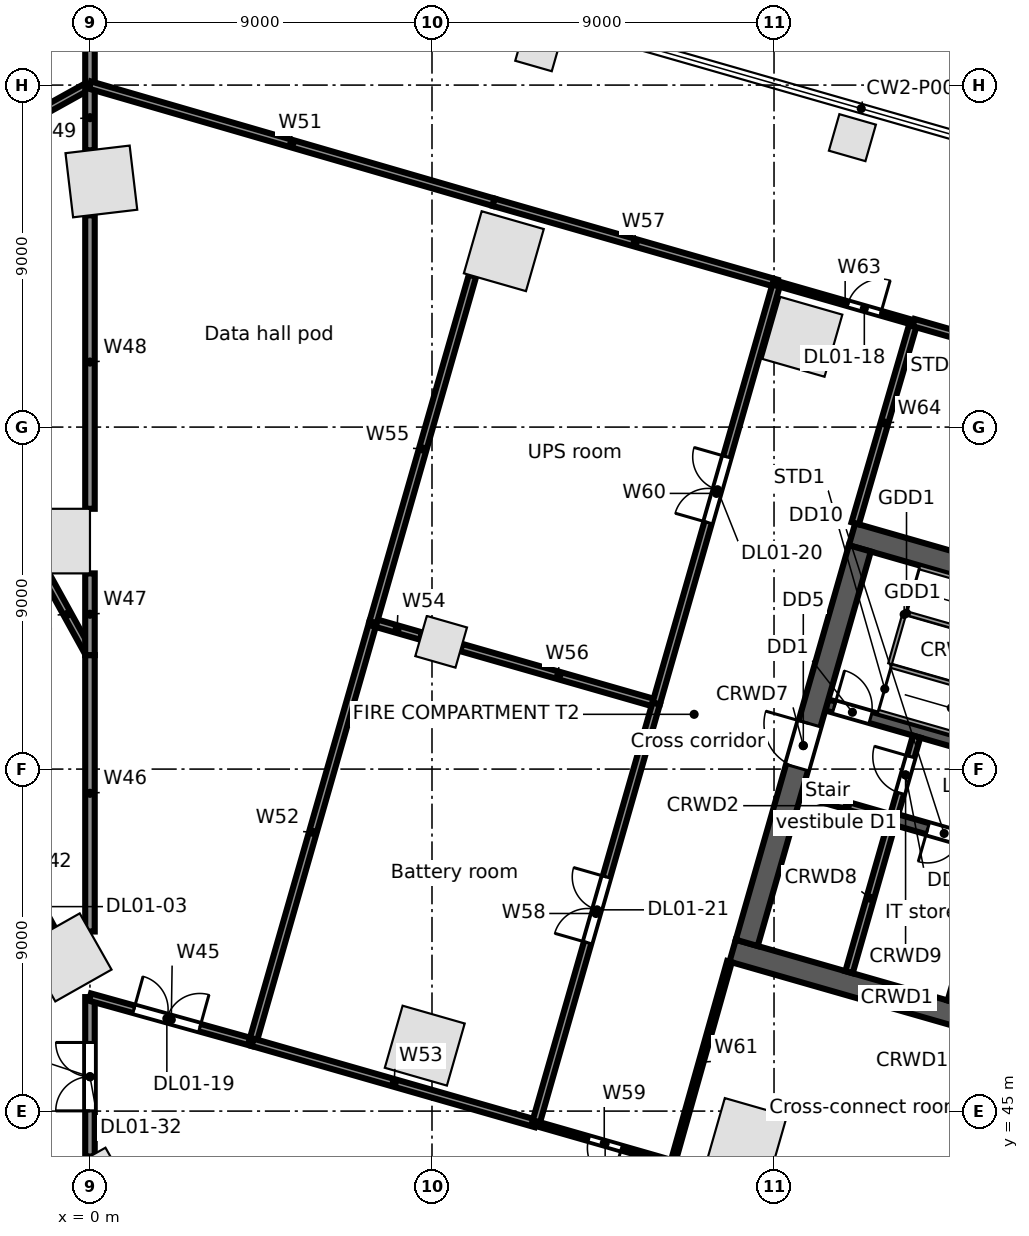
"""IFC4 building model, lengths in metres.
Left out: names, types, materials, properties, quantities, classifications, styles, units other than length and angle.
Written with IfcOpenShell. Run it as: python <this file> out.ifc"""

import sys

from ifc_helpers import new_model, si_unit, direction, frame, frame_2d, origin, origin_2d, place, context, subcontext, project, spatial, rectangle, extrude, element, fill, save


model = new_model("IFC4")
c1 = context("Model", 3, precision=1e-05, world=origin(), true_north=direction((0.0, 1.0)))
c2 = subcontext(c1, "Body", "Model", "MODEL_VIEW")
j1 = project(units=[si_unit("LENGTHUNIT", "METRE"), si_unit("PLANEANGLEUNIT", "RADIAN")], contexts=[c1])
p1 = place(None, origin())
s1 = spatial("IfcSite", under=j1, at=p1, CompositionType="ELEMENT")
p2 = place(p1, origin())
s2 = spatial("IfcBuilding", under=s1, at=p2, CompositionType="ELEMENT")
p3 = place(p2, frame((0.0, 0.0, 11.5)))
s3 = spatial("IfcBuildingStorey", under=s2, at=p3, CompositionType="ELEMENT", Elevation=11.5)
for number, where, z_axis, x_axis in (
    (1, (18.746, 65.376, 0.0), (0.0, 0.0, 1.0), (-0.961, 0.276, 0.0)),
    (2, (10.89, 67.629, 0.0), (0.0, 0.0, 1.0), (-0.961, 0.276, 0.0)),
    (3, (0.3, 69.464, 0.0), (0.0, 0.0, 1.0), (-0.993, -0.118, 0.0)),
    (4, (-0.591, 49.044, 0.0), (0.0, 0.0, 1.0), (0.87, 0.492, 0.0)),
    (5, (8.81, 46.722, 0.0), (0.0, 0.0, 1.0), (0.961, -0.276, 0.0)),
    (6, (17.288, 44.291, 0.0), (0.0, 0.0, 1.0), (0.961, -0.276, 0.0)),
    (7, (-0.85, 60.0, 0.0), (0.0, 0.0, 1.0), (0.0, 1.0, 0.0)),
):
    element("IfcColumn", number, at=place(p3, frame(where, z_axis=z_axis, x_axis=x_axis)), inside=s3, PredefinedType="COLUMN", context=c2, shape_type="SweptSolid", body=[
        extrude(rectangle(XDim=1.7, YDim=1.7, at=origin_2d()), origin(), (0.0, 0.0, 1.0), 5.0),
    ])
for number, where, z_axis, x_axis in (
    (8, (20.062, 70.616, 0.0), (0.0, 0.0, 1.0), (-0.961, 0.276, 0.0)),
    (9, (11.809, 72.983, 0.0), (0.0, 0.0, 1.0), (-0.961, 0.276, 0.0)),
    (10, (0.219, 43.355, 0.0), (0.0, 0.0, 1.0), (0.87, 0.492, 0.0)),
):
    element("IfcColumn", number, at=place(p3, frame(where, z_axis=z_axis, x_axis=x_axis)), inside=s3, PredefinedType="COLUMN", context=c2, shape_type="SweptSolid", body=[
        extrude(rectangle(XDim=1.0, YDim=1.0, at=origin_2d()), origin(), (0.0, 0.0, 1.0), 5.0),
    ])
p4 = place(p3, frame((9.241, 57.35, 0.0), z_axis=(0.0, 0.0, 1.0), x_axis=(0.961261695938, -0.275637355817, 0.0)))
e11 = element("IfcColumn", 11, at=p4, inside=s3, PredefinedType="COLUMN", context=c2, shape_type="SweptSolid", body=[
    extrude(rectangle(XDim=1.1, YDim=1.1, at=origin_2d()), origin(), (0.0, 0.0, 1.0), 5.0),
])
p5 = place(p3, frame((16.911, 49.221, 0.0), z_axis=(0.0, 0.0, 1.0), x_axis=(0.96126248289, -0.275634611374, 0.0)))
e12 = element("IfcWall", 12, at=p5, inside=s3, PredefinedType="SOLIDWALL", context=c2, shape_type="SweptSolid", body=[
    extrude(rectangle(XDim=9.0, YDim=0.6, at=frame_2d((4.5, 0.0))), origin(), (0.0, 0.0, 1.0), 4.65),
])
p6 = place(p3, frame((18.728, 53.382, 0.0), z_axis=(0.0, 0.0, 1.0), x_axis=(0.961247070632, -0.275688355216, 0.0)))
e13 = element("IfcWall", 13, at=p6, inside=s3, PredefinedType="SOLIDWALL", context=c2, shape_type="SweptSolid", body=[
    extrude(rectangle(XDim=2.5, YDim=0.2, at=frame_2d((1.25, 0.0))), origin(), (0.0, 0.0, 1.0), 4.65),
])
p7 = place(p3, frame((21.131, 52.692, 0.0), z_axis=(0.0, 0.0, 1.0), x_axis=(0.961271492568, -0.275603188616, 0.0)))
e14 = element("IfcWall", 14, at=p7, inside=s3, PredefinedType="SOLIDWALL", context=c2, shape_type="SweptSolid", body=[
    extrude(rectangle(XDim=5.3, YDim=0.3, at=frame_2d((2.65, 0.0))), origin(), (0.0, 0.0, 1.0), 4.65),
])
p8 = place(p7, frame((0.95, 0.0, 0.0)))
e15 = element("IfcOpeningElement", 15, at=p8, cuts=e14, PredefinedType="OPENING", context=c2, shape_type="SweptSolid", body=[
    extrude(rectangle(XDim=0.9, YDim=2.1, at=frame_2d((0.45, 1.05))), frame((0.0, 0.16, 0.0), z_axis=(0.0, -1.0, 0.0), x_axis=(1.0, 0.0, 0.0)), (0.0, 0.0, 1.0), 0.32),
])
p9 = place(p7, frame((3.75, 0.0, 0.0)))
e16 = element("IfcOpeningElement", 16, at=p9, cuts=e14, PredefinedType="OPENING", context=c2, shape_type="SweptSolid", body=[
    extrude(rectangle(XDim=0.9, YDim=2.1, at=frame_2d((0.45, 1.05))), frame((0.0, 0.16, 0.0), z_axis=(0.0, -1.0, 0.0), x_axis=(1.0, 0.0, 0.0)), (0.0, 0.0, 1.0), 0.32),
])
p10 = place(p3, frame((19.389, 55.689, 0.0), z_axis=(0.0, 0.0, 1.0), x_axis=(0.961261397636, -0.275638396117, 0.0)))
e17 = element("IfcWall", 17, at=p10, inside=s3, PredefinedType="SOLIDWALL", context=c2, shape_type="SweptSolid", body=[
    extrude(rectangle(XDim=7.1, YDim=0.3, at=frame_2d((3.55, 0.0))), origin(), (0.0, 0.0, 1.0), 4.65),
])
p11 = place(p10, frame((0.2, 0.0, 0.0)))
e18 = element("IfcOpeningElement", 18, at=p11, cuts=e17, PredefinedType="OPENING", context=c2, shape_type="SweptSolid", body=[
    extrude(rectangle(XDim=1.0, YDim=2.1, at=frame_2d((0.5, 1.05))), frame((0.0, 0.16, 0.0), z_axis=(0.0, -1.0, 0.0), x_axis=(1.0, 0.0, 0.0)), (0.0, 0.0, 1.0), 0.32),
])
p12 = place(p3, frame((20.053, 60.18, 0.0), z_axis=(0.0, 0.0, 1.0), x_axis=(0.96126248289, -0.275634611374, 0.0)))
e19 = element("IfcWall", 19, at=p12, inside=s3, PredefinedType="SOLIDWALL", context=c2, shape_type="SweptSolid", body=[
    extrude(rectangle(XDim=9.0, YDim=0.6, at=frame_2d((4.5, 0.0))), origin(), (0.0, 0.0, 1.0), 4.65),
])
p13 = place(p3, frame((17.282, 49.427, 0.0), z_axis=(0.0, 0.0, 1.0), x_axis=(0.275631631629, 0.961263337304, 0.0)))
e20 = element("IfcWall", 20, at=p13, inside=s3, PredefinedType="SOLIDWALL", context=c2, shape_type="SweptSolid", body=[
    extrude(rectangle(XDim=10.8, YDim=0.6, at=frame_2d((5.4, 0.0))), origin(), (0.0, 0.0, 1.0), 4.65),
])
p14 = place(p13, frame((4.8, 0.0, 0.0)))
e21 = element("IfcOpeningElement", 21, at=p14, cuts=e20, PredefinedType="OPENING", context=c2, shape_type="SweptSolid", body=[
    extrude(rectangle(XDim=1.2, YDim=2.1, at=frame_2d((0.6, 1.05))), frame((0.0, 0.31, 0.0), z_axis=(0.0, -1.0, 0.0), x_axis=(1.0, 0.0, 0.0)), (0.0, 0.0, 1.0), 0.62),
])
p15 = place(p3, frame((19.973, 48.655, 0.0), z_axis=(0.0, 0.0, 1.0), x_axis=(0.275668441653, 0.961252781674, 0.0)))
e22 = element("IfcWall", 22, at=p15, inside=s3, PredefinedType="SOLIDWALL", context=c2, shape_type="SweptSolid", body=[
    extrude(rectangle(XDim=4.05, YDim=0.2, at=frame_2d((2.025, 0.0))), origin(), (0.0, 0.0, 1.0), 4.65),
])
p16 = place(p3, frame((21.172, 52.837, 0.0), z_axis=(0.0, 0.0, 1.0), x_axis=(0.275657676022, 0.961255868981, 0.0)))
e23 = element("IfcWall", 23, at=p16, inside=s3, PredefinedType="PARTITIONING", context=c2, shape_type="SweptSolid", body=[
    extrude(rectangle(XDim=2.1, YDim=0.2, at=frame_2d((1.05, 0.0))), origin(), (0.0, 0.0, 1.0), 4.65),
])
p17 = place(p16, frame((0.55, 0.0, 0.0)))
e24 = element("IfcOpeningElement", 24, at=p17, cuts=e23, PredefinedType="OPENING", context=c2, shape_type="SweptSolid", body=[
    extrude(rectangle(XDim=1.0, YDim=2.1, at=frame_2d((0.5, 1.05))), frame((0.0, 0.11, 0.0), z_axis=(0.0, -1.0, 0.0), x_axis=(1.0, 0.0, 0.0)), (0.0, 0.0, 1.0), 0.22),
])
p18 = place(p3, frame((22.665, 47.883, 0.0), z_axis=(0.0, 0.0, 1.0), x_axis=(0.275596769212, 0.961273333033, 0.0)))
e25 = element("IfcWall", 25, at=p18, inside=s3, PredefinedType="PARTITIONING", context=c2, shape_type="SweptSolid", body=[
    extrude(rectangle(XDim=4.05, YDim=0.2, at=frame_2d((2.025, 0.0))), origin(), (0.0, 0.0, 1.0), 4.65),
])
p19 = place(p3, frame((-6.337, 68.478, 0.0), z_axis=(0.0, 0.0, 1.0), x_axis=(0.87407148623, 0.485797320864, 0.0)))
e26 = element("IfcWall", 26, at=p19, inside=s3, PredefinedType="PARTITIONING", context=c2, shape_type="SweptSolid", body=[
    extrude(rectangle(XDim=7.25, YDim=0.2, at=frame_2d((3.625, 0.0))), origin(), (0.0, 0.0, 1.0), 3.93),
])
p20 = place(p19, frame((2.7, 0.0, 0.0)))
e27 = element("IfcOpeningElement", 27, at=p20, cuts=e26, PredefinedType="OPENING", context=c2, shape_type="SweptSolid", body=[
    extrude(rectangle(XDim=1.8, YDim=2.1, at=frame_2d((0.9, 1.05))), frame((0.0, 0.11, 0.0), z_axis=(0.0, -1.0, 0.0), x_axis=(1.0, 0.0, 0.0)), (0.0, 0.0, 1.0), 0.22),
])
p21 = place(p3, frame((-1.883, 51.467, 0.0), z_axis=(0.0, 0.0, 1.0), x_axis=(0.477162952876, -0.878814836244, 0.0)))
e28 = element("IfcWall", 28, at=p21, inside=s3, PredefinedType="PARTITIONING", context=c2, shape_type="SweptSolid", body=[
    extrude(rectangle(XDim=1.895, YDim=0.125, at=frame_2d((0.947, 0.0))), origin(), (0.0, 0.0, 1.0), 4.65),
])
p22 = place(p3, frame((-1.187, 59.15, 0.0), z_axis=(0.0, 0.0, 1.0), x_axis=(0.483345381597, -0.875429747089, 0.0)))
e29 = element("IfcWall", 29, at=p22, inside=s3, PredefinedType="PARTITIONING", context=c2, shape_type="SweptSolid", body=[
    extrude(rectangle(XDim=2.456, YDim=0.2, at=frame_2d((1.228, 0.0))), origin(), (0.0, 0.0, 1.0), 4.65),
])
p23 = place(p3, frame((0.0, 43.806, 0.0), z_axis=(0.0, 0.0, 1.0), x_axis=(0.0, 1.0, 0.0)))
e30 = element("IfcWall", 30, at=p23, inside=s3, PredefinedType="PARTITIONING", context=c2, shape_type="SweptSolid", body=[
    extrude(rectangle(XDim=4.194, YDim=0.25, at=frame_2d((2.097, 0.0))), origin(), (0.0, 0.0, 1.0), 3.712),
])
p24 = place(p23, frame((1.2, 0.0, 0.0)))
e31 = element("IfcOpeningElement", 31, at=p24, cuts=e30, PredefinedType="OPENING", context=c2, shape_type="SweptSolid", body=[
    extrude(rectangle(XDim=1.8, YDim=2.1, at=frame_2d((0.9, 1.05))), frame((0.0, 0.135, 0.0), z_axis=(0.0, -1.0, 0.0), x_axis=(1.0, 0.0, 0.0)), (0.0, 0.0, 1.0), 0.27),
])
p25 = place(p3, frame((0.0, 48.0, 0.0), z_axis=(0.0, 0.0, 1.0), x_axis=(0.963400508162, -0.268066150181, 0.0)))
e32 = element("IfcWall", 32, at=p25, inside=s3, PredefinedType="PARTITIONING", context=c2, shape_type="SweptSolid", body=[
    extrude(rectangle(XDim=4.443, YDim=0.2, at=frame_2d((2.221, 0.0))), origin(), (0.0, 0.0, 1.0), 4.65),
])
p26 = place(p25, frame((1.2, 0.0, 0.0)))
e33 = element("IfcOpeningElement", 33, at=p26, cuts=e32, PredefinedType="OPENING", context=c2, shape_type="SweptSolid", body=[
    extrude(rectangle(XDim=1.8, YDim=2.1, at=frame_2d((0.9, 1.05))), frame((0.0, 0.11, 0.0), z_axis=(0.0, -1.0, 0.0), x_axis=(1.0, 0.0, 0.0)), (0.0, 0.0, 1.0), 0.22),
])
p27 = place(p3, frame((0.0, 49.726, 0.0), z_axis=(0.0, 0.0, 1.0), x_axis=(0.0, 1.0, 0.0)))
e34 = element("IfcWall", 34, at=p27, inside=s3, PredefinedType="PARTITIONING", context=c2, shape_type="SweptSolid", body=[
    extrude(rectangle(XDim=7.274, YDim=0.25, at=frame_2d((3.637, 0.0))), origin(), (0.0, 0.0, 1.0), 4.65),
])
p28 = place(p3, frame((0.0, 57.0, 0.0), z_axis=(0.0, 0.0, 1.0), x_axis=(0.0, 1.0, 0.0)))
e35 = element("IfcWall", 35, at=p28, inside=s3, PredefinedType="PARTITIONING", context=c2, shape_type="SweptSolid", body=[
    extrude(rectangle(XDim=2.15, YDim=0.25, at=frame_2d((1.075, 0.0))), origin(), (0.0, 0.0, 1.0), 4.65),
])
p29 = place(p3, frame((0.0, 60.85, 0.0), z_axis=(0.0, 0.0, 1.0), x_axis=(0.0, 1.0, 0.0)))
e36 = element("IfcWall", 36, at=p29, inside=s3, PredefinedType="PARTITIONING", context=c2, shape_type="SweptSolid", body=[
    extrude(rectangle(XDim=7.723, YDim=0.25, at=frame_2d((3.861, 0.0))), origin(), (0.0, 0.0, 1.0), 3.93),
])
p30 = place(p3, frame((0.0, 70.285, 0.0), z_axis=(0.0, 0.0, 1.0), x_axis=(0.0, 1.0, 0.0)))
e37 = element("IfcWall", 37, at=p30, inside=s3, PredefinedType="PARTITIONING", context=c2, shape_type="SweptSolid", body=[
    extrude(rectangle(XDim=1.715, YDim=0.25, at=frame_2d((0.857, 0.0))), origin(), (0.0, 0.0, 1.0), 4.65),
])
p31 = place(p3, frame((0.0, 72.0, 0.0), z_axis=(0.0, 0.0, 1.0), x_axis=(0.0, 1.0, 0.0)))
e38 = element("IfcWall", 38, at=p31, inside=s3, PredefinedType="PARTITIONING", context=c2, shape_type="SweptSolid", body=[
    extrude(rectangle(XDim=3.521, YDim=0.25, at=frame_2d((1.76, 0.0))), origin(), (0.0, 0.0, 1.0), 4.024),
])
p32 = place(p3, frame((0.0, 72.0, 0.0), z_axis=(0.0, 0.0, 1.0), x_axis=(0.960375968852, -0.278707729443, 0.0)))
e39 = element("IfcWall", 39, at=p32, inside=s3, PredefinedType="PARTITIONING", context=c2, shape_type="SweptSolid", body=[
    extrude(rectangle(XDim=11.058, YDim=0.2, at=frame_2d((5.529, 0.0))), origin(), (0.0, 0.0, 1.0), 3.712),
])
p33 = place(p3, frame((4.28, 46.809, 0.0), z_axis=(0.0, 0.0, 1.0), x_axis=(0.275635044812, 0.961262358605, 0.0)))
e40 = element("IfcWall", 40, at=p33, inside=s3, PredefinedType="PARTITIONING", context=c2, shape_type="SweptSolid", body=[
    extrude(rectangle(XDim=11.5, YDim=0.2, at=frame_2d((5.75, 0.0))), origin(), (0.0, 0.0, 1.0), 3.712),
])
p34 = place(p3, frame((4.28, 46.809, 0.0), z_axis=(0.0, 0.0, 1.0), x_axis=(0.961270337968, -0.275607215693, 0.0)))
e41 = element("IfcWall", 41, at=p34, inside=s3, PredefinedType="PARTITIONING", context=c2, shape_type="SweptSolid", body=[
    extrude(rectangle(XDim=7.75, YDim=0.2, at=frame_2d((3.875, 0.0))), origin(), (0.0, 0.0, 1.0), 4.03),
])
p35 = place(p3, frame((7.45, 57.864, 0.0), z_axis=(0.0, 0.0, 1.0), x_axis=(0.961221622993, -0.275777068465, 0.0)))
e42 = element("IfcWall", 42, at=p35, inside=s3, PredefinedType="PARTITIONING", context=c2, shape_type="SweptSolid", body=[
    extrude(rectangle(XDim=1.313, YDim=0.2, at=frame_2d((0.656, 0.0))), origin(), (0.0, 0.0, 1.0), 3.712),
])
p36 = place(p3, frame((7.45, 57.864, 0.0), z_axis=(0.0, 0.0, 1.0), x_axis=(0.275710305557, 0.961240774941, 0.0)))
e43 = element("IfcWall", 43, at=p36, inside=s3, PredefinedType="PARTITIONING", context=c2, shape_type="SweptSolid", body=[
    extrude(rectangle(XDim=9.485, YDim=0.2, at=frame_2d((4.742, 0.0))), origin(), (0.0, 0.0, 1.0), 3.712),
])
p37 = place(p3, frame((9.77, 57.199, 0.0), z_axis=(0.0, 0.0, 1.0), x_axis=(0.961262835898, -0.275633380273, 0.0)))
e44 = element("IfcWall", 44, at=p37, inside=s3, PredefinedType="PARTITIONING", context=c2, shape_type="SweptSolid", body=[
    extrude(rectangle(XDim=5.337, YDim=0.2, at=frame_2d((2.668, 0.0))), origin(), (0.0, 0.0, 1.0), 3.712),
])
p38 = place(p3, frame((10.62, 68.918, 0.0), z_axis=(0.0, 0.0, 1.0), x_axis=(0.961260764876, -0.275640602796, 0.0)))
e45 = element("IfcWall", 45, at=p38, inside=s3, PredefinedType="PARTITIONING", context=c2, shape_type="SweptSolid", body=[
    extrude(rectangle(XDim=7.749, YDim=0.2, at=frame_2d((3.875, 0.0))), origin(), (0.0, 0.0, 1.0), 3.712),
])
p39 = place(p3, frame((11.73, 44.673, 0.0), z_axis=(0.0, 0.0, 1.0), x_axis=(0.275635044812, 0.961262358605, 0.0)))
e46 = element("IfcWall", 46, at=p39, inside=s3, PredefinedType="PARTITIONING", context=c2, shape_type="SweptSolid", body=[
    extrude(rectangle(XDim=11.5, YDim=0.2, at=frame_2d((5.75, 0.0))), origin(), (0.0, 0.0, 1.0), 3.712),
])
p40 = place(p39, frame((4.95, 0.0, 0.0)))
e47 = element("IfcOpeningElement", 47, at=p40, cuts=e46, PredefinedType="OPENING", context=c2, shape_type="SweptSolid", body=[
    extrude(rectangle(XDim=1.8, YDim=2.1, at=frame_2d((0.9, 1.05))), frame((0.0, 0.11, 0.0), z_axis=(0.0, -1.0, 0.0), x_axis=(1.0, 0.0, 0.0)), (0.0, 0.0, 1.0), 0.22),
])
p41 = place(p3, frame((11.73, 44.673, 0.0), z_axis=(0.0, 0.0, 1.0), x_axis=(0.961228613303, -0.275752702557, 0.0)))
e48 = element("IfcWall", 48, at=p41, inside=s3, PredefinedType="PARTITIONING", context=c2, shape_type="SweptSolid", body=[
    extrude(rectangle(XDim=3.75, YDim=0.125, at=frame_2d((1.875, 0.0))), origin(), (0.0, 0.0, 1.0), 4.65),
])
p42 = place(p41, frame((1.45, 0.0, 0.0)))
e49 = element("IfcOpeningElement", 49, at=p42, cuts=e48, PredefinedType="OPENING", context=c2, shape_type="SweptSolid", body=[
    extrude(rectangle(XDim=0.9, YDim=2.1, at=frame_2d((0.45, 1.05))), frame((0.0, 0.073, 0.0), z_axis=(0.0, -1.0, 0.0), x_axis=(1.0, 0.0, 0.0)), (0.0, 0.0, 1.0), 0.145),
])
p43 = place(p3, frame((14.9, 55.728, 0.0), z_axis=(0.0, 0.0, 1.0), x_axis=(0.27559869205, 0.961272781754, 0.0)))
e50 = element("IfcWall", 50, at=p43, inside=s3, PredefinedType="PARTITIONING", context=c2, shape_type="SweptSolid", body=[
    extrude(rectangle(XDim=11.499, YDim=0.2, at=frame_2d((5.75, 0.0))), origin(), (0.0, 0.0, 1.0), 3.712),
])
p44 = place(p43, frame((4.95, 0.0, 0.0)))
e51 = element("IfcOpeningElement", 51, at=p44, cuts=e50, PredefinedType="OPENING", context=c2, shape_type="SweptSolid", body=[
    extrude(rectangle(XDim=1.8, YDim=2.1, at=frame_2d((0.9, 1.05))), frame((0.0, 0.11, 0.0), z_axis=(0.0, -1.0, 0.0), x_axis=(1.0, 0.0, 0.0)), (0.0, 0.0, 1.0), 0.22),
])
p45 = place(p3, frame((15.335, 43.639, 0.0), z_axis=(0.0, 0.0, 1.0), x_axis=(0.271407455373, 0.962464541252, 0.0)))
e52 = element("IfcWall", 52, at=p45, inside=s3, PredefinedType="PARTITIONING", context=c2, shape_type="SweptSolid", body=[
    extrude(rectangle(XDim=5.501, YDim=0.125, at=frame_2d((2.75, 0.0))), origin(), (0.0, 0.0, 1.0), 3.93),
])
p46 = place(p3, frame((18.069, 66.782, 0.0), z_axis=(0.0, 0.0, 1.0), x_axis=(0.961314848061, -0.275451924837, 0.0)))
e53 = element("IfcWall", 53, at=p46, inside=s3, PredefinedType="PARTITIONING", context=c2, shape_type="SweptSolid", body=[
    extrude(rectangle(XDim=3.75, YDim=0.125, at=frame_2d((1.875, 0.0))), origin(), (0.0, 0.0, 1.0), 3.712),
])
p47 = place(p46, frame((1.95, 0.0, 0.0)))
e54 = element("IfcOpeningElement", 54, at=p47, cuts=e53, PredefinedType="OPENING", context=c2, shape_type="SweptSolid", body=[
    extrude(rectangle(XDim=0.9, YDim=2.1, at=frame_2d((0.45, 1.05))), frame((0.0, 0.073, 0.0), z_axis=(0.0, -1.0, 0.0), x_axis=(1.0, 0.0, 0.0)), (0.0, 0.0, 1.0), 0.145),
])
p48 = place(p3, frame((20.136, 60.468, 0.0), z_axis=(0.0, 0.0, 1.0), x_axis=(0.279630121779, 0.96010780384, 0.0)))
e55 = element("IfcWall", 55, at=p48, inside=s3, PredefinedType="PARTITIONING", context=c2, shape_type="SweptSolid", body=[
    extrude(rectangle(XDim=5.5, YDim=0.2, at=frame_2d((2.75, 0.0))), origin(), (0.0, 0.0, 1.0), 4.018),
])
p49 = place(p3, frame((21.674, 65.749, 0.0), z_axis=(0.0, 0.0, 1.0), x_axis=(0.961259417468, -0.275645301662, 0.0)))
e56 = element("IfcWall", 56, at=p49, inside=s3, PredefinedType="PARTITIONING", context=c2, shape_type="SweptSolid", body=[
    extrude(rectangle(XDim=9.0, YDim=0.2, at=frame_2d((4.5, 0.0))), origin(), (0.0, 0.0, 1.0), 3.822),
])
p50 = place(p11, origin())
e57 = element("IfcDoor", 57, at=p50, inside=s3, OperationType="SINGLE_SWING_LEFT", PredefinedType="DOOR", context=c2, shape_type="SweptSolid", body=[
    extrude(rectangle(XDim=1.0, YDim=2.1, at=frame_2d((0.5, 1.05))), frame((0.0, 0.025, 0.0), z_axis=(0.0, -1.0, 0.0), x_axis=(1.0, 0.0, 0.0)), (0.0, 0.0, 1.0), 0.05),
])
fill(e18, e57)
p51 = place(p17, origin())
e58 = element("IfcDoor", 58, at=p51, inside=s3, OperationType="SINGLE_SWING_RIGHT", PredefinedType="DOOR", context=c2, shape_type="SweptSolid", body=[
    extrude(rectangle(XDim=1.0, YDim=2.1, at=frame_2d((0.5, 1.05))), frame((0.0, 0.025, 0.0), z_axis=(0.0, -1.0, 0.0), x_axis=(1.0, 0.0, 0.0)), (0.0, 0.0, 1.0), 0.05),
])
fill(e24, e58)
p52 = place(p14, origin())
e59 = element("IfcDoor", 59, at=p52, inside=s3, OperationType="SINGLE_SWING_RIGHT", PredefinedType="DOOR", context=c2, shape_type="SweptSolid", body=[
    extrude(rectangle(XDim=1.2, YDim=2.1, at=frame_2d((0.6, 1.05))), frame((0.0, 0.025, 0.0), z_axis=(0.0, -1.0, 0.0), x_axis=(1.0, 0.0, 0.0)), (0.0, 0.0, 1.0), 0.05),
])
fill(e21, e59)
p53 = place(p8, frame((0.9, 0.0, 0.0), z_axis=(0.0, 0.0, 1.0), x_axis=(-1.0, 0.0, 0.0)))
e60 = element("IfcDoor", 60, at=p53, inside=s3, OperationType="SINGLE_SWING_RIGHT", PredefinedType="DOOR", context=c2, shape_type="SweptSolid", body=[
    extrude(rectangle(XDim=0.9, YDim=2.1, at=frame_2d((0.45, 1.05))), frame((0.0, 0.025, 0.0), z_axis=(0.0, -1.0, 0.0), x_axis=(1.0, 0.0, 0.0)), (0.0, 0.0, 1.0), 0.05),
])
fill(e15, e60)
p54 = place(p42, frame((0.9, 0.0, 0.0), z_axis=(0.0, 0.0, 1.0), x_axis=(-1.0, 0.0, 0.0)))
e61 = element("IfcDoor", 61, at=p54, inside=s3, OperationType="SINGLE_SWING_LEFT", PredefinedType="DOOR", context=c2, shape_type="SweptSolid", body=[
    extrude(rectangle(XDim=0.9, YDim=2.1, at=frame_2d((0.45, 1.05))), frame((0.0, 0.025, 0.0), z_axis=(0.0, -1.0, 0.0), x_axis=(1.0, 0.0, 0.0)), (0.0, 0.0, 1.0), 0.05),
])
fill(e49, e61)
p55 = place(p47, origin())
e62 = element("IfcDoor", 62, at=p55, inside=s3, OperationType="SINGLE_SWING_RIGHT", PredefinedType="DOOR", context=c2, shape_type="SweptSolid", body=[
    extrude(rectangle(XDim=0.9, YDim=2.1, at=frame_2d((0.45, 1.05))), frame((0.0, 0.025, 0.0), z_axis=(0.0, -1.0, 0.0), x_axis=(1.0, 0.0, 0.0)), (0.0, 0.0, 1.0), 0.05),
])
fill(e54, e62)
p56 = place(p26, origin())
e63 = element("IfcDoor", 63, at=p56, inside=s3, OperationType="DOUBLE_DOOR_SINGLE_SWING", PredefinedType="DOOR", context=c2, shape_type="SweptSolid", body=[
    extrude(rectangle(XDim=1.8, YDim=2.1, at=frame_2d((0.9, 1.05))), frame((0.0, 0.025, 0.0), z_axis=(0.0, -1.0, 0.0), x_axis=(1.0, 0.0, 0.0)), (0.0, 0.0, 1.0), 0.05),
])
fill(e33, e63)
p57 = place(p44, origin())
e64 = element("IfcDoor", 64, at=p57, inside=s3, OperationType="DOUBLE_DOOR_SINGLE_SWING", PredefinedType="DOOR", context=c2, shape_type="SweptSolid", body=[
    extrude(rectangle(XDim=1.8, YDim=2.1, at=frame_2d((0.9, 1.05))), frame((0.0, 0.025, 0.0), z_axis=(0.0, -1.0, 0.0), x_axis=(1.0, 0.0, 0.0)), (0.0, 0.0, 1.0), 0.05),
])
fill(e51, e64)
p58 = place(p40, origin())
e65 = element("IfcDoor", 65, at=p58, inside=s3, OperationType="DOUBLE_DOOR_SINGLE_SWING", PredefinedType="DOOR", context=c2, shape_type="SweptSolid", body=[
    extrude(rectangle(XDim=1.8, YDim=2.1, at=frame_2d((0.9, 1.05))), frame((0.0, 0.025, 0.0), z_axis=(0.0, -1.0, 0.0), x_axis=(1.0, 0.0, 0.0)), (0.0, 0.0, 1.0), 0.05),
])
fill(e47, e65)
p59 = place(p24, origin())
e66 = element("IfcDoor", 66, at=p59, inside=s3, OperationType="DOUBLE_DOOR_SINGLE_SWING", PredefinedType="DOOR", context=c2, shape_type="SweptSolid", body=[
    extrude(rectangle(XDim=1.8, YDim=2.1, at=frame_2d((0.9, 1.05))), frame((0.0, 0.025, 0.0), z_axis=(0.0, -1.0, 0.0), x_axis=(1.0, 0.0, 0.0)), (0.0, 0.0, 1.0), 0.05),
])
fill(e31, e66)
save(model, sys.argv[1])
